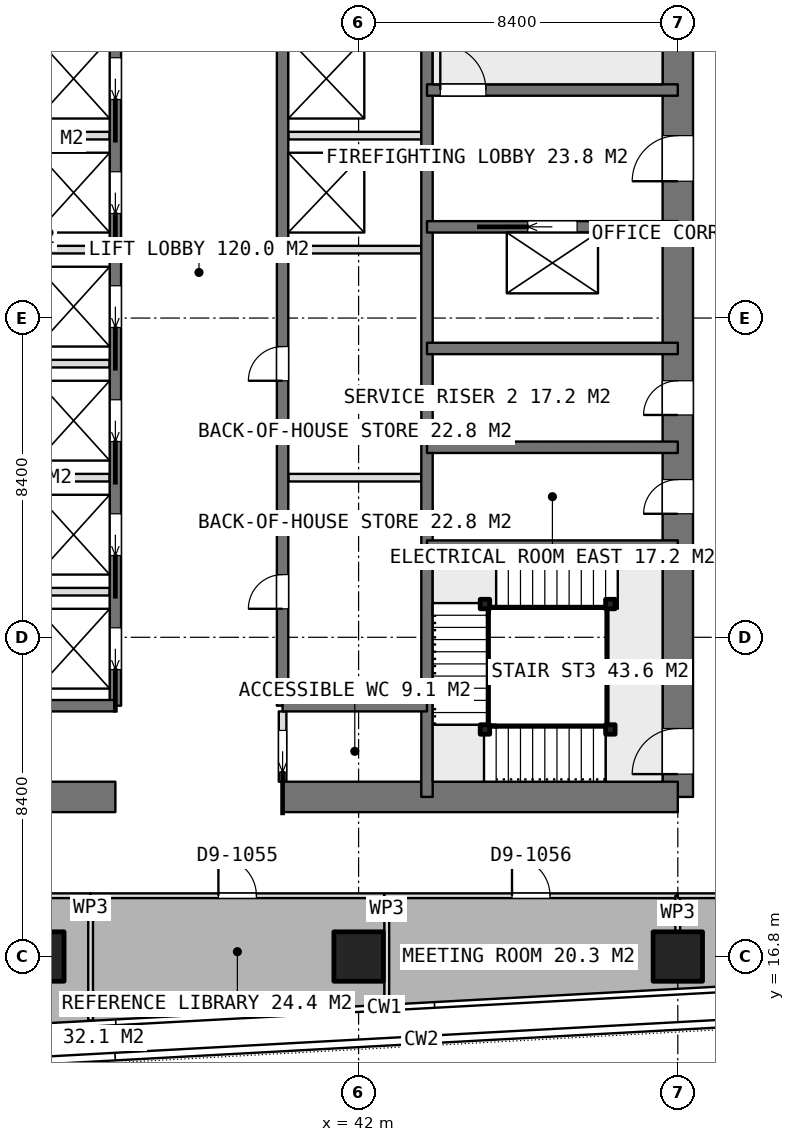
"""IFC4 building model, lengths in metres.
Left out: names, types, materials, properties, quantities, classifications, styles, units other than length and angle.
Written with IfcOpenShell. Run it as: python <this file> out.ifc"""

import sys

from ifc_helpers import new_model, si_unit, direction, frame, frame_2d, origin, origin_2d, place, context, subcontext, project, spatial, rectangle, extrude, element, fill, save


model = new_model("IFC4")
c1 = context("Model", 3, precision=1e-05, world=origin(), true_north=direction((0.0, 1.0)))
c2 = subcontext(c1, "Body", "Model", "MODEL_VIEW")
j1 = project(units=[si_unit("LENGTHUNIT", "METRE"), si_unit("PLANEANGLEUNIT", "RADIAN")], contexts=[c1])
p1 = place(None, origin())
s1 = spatial("IfcSite", under=j1, at=p1, CompositionType="ELEMENT")
p2 = place(p1, origin())
s2 = spatial("IfcBuilding", under=s1, at=p2, CompositionType="ELEMENT")
p3 = place(p2, frame((0.0, 0.0, 287.6)))
s3 = spatial("IfcBuildingStorey", under=s2, at=p3, CompositionType="ELEMENT", Elevation=287.6)
p4 = place(p3, frame((25.2, 21.0, 0.0), z_axis=(0.0, 0.0, 1.0), x_axis=(1.0, 0.0, 0.0)))
e1 = element("IfcWall", 1, at=p4, inside=s3, PredefinedType="SHEAR", context=c2, shape_type="SweptSolid", body=[
    extrude(rectangle(XDim=10.4, YDim=0.8, at=frame_2d((5.2, 0.0))), origin(), (0.0, 0.0, 1.0), 3.75),
])
p5 = place(p3, frame((40.0, 21.0, 0.0), z_axis=(0.0, 0.0, 1.0), x_axis=(1.0, 0.0, 0.0)))
e2 = element("IfcWall", 2, at=p5, inside=s3, PredefinedType="SHEAR", context=c2, shape_type="SweptSolid", body=[
    extrude(rectangle(XDim=10.4, YDim=0.8, at=frame_2d((5.2, 0.0))), origin(), (0.0, 0.0, 1.0), 3.75),
])
p6 = place(p3, frame((50.4, 21.0, 0.0), z_axis=(0.0, 0.0, 1.0), x_axis=(0.0, 1.0, 0.0)))
e3 = element("IfcWall", 3, at=p6, inside=s3, PredefinedType="SHEAR", context=c2, shape_type="SweptSolid", body=[
    extrude(rectangle(XDim=25.2, YDim=0.8, at=frame_2d((12.6, 0.0))), origin(), (0.0, 0.0, 1.0), 3.75),
])
p7 = place(p6, frame((16.2, 0.0, 0.0)))
e4 = element("IfcOpeningElement", 4, at=p7, cuts=e3, PredefinedType="OPENING", context=c2, shape_type="SweptSolid", body=[
    extrude(rectangle(XDim=1.2, YDim=2.1, at=frame_2d((0.6, 1.05))), frame((0.0, 0.41, 0.0), z_axis=(0.0, -1.0, 0.0), x_axis=(1.0, 0.0, 0.0)), (0.0, 0.0, 1.0), 0.82),
])
p8 = place(p6, frame((10.05, 0.0, 0.0)))
e5 = element("IfcOpeningElement", 5, at=p8, cuts=e3, PredefinedType="OPENING", context=c2, shape_type="SweptSolid", body=[
    extrude(rectangle(XDim=0.9, YDim=2.1, at=frame_2d((0.45, 1.05))), frame((0.0, 0.41, 0.0), z_axis=(0.0, -1.0, 0.0), x_axis=(1.0, 0.0, 0.0)), (0.0, 0.0, 1.0), 0.82),
])
p9 = place(p6, frame((7.45, 0.0, 0.0)))
e6 = element("IfcOpeningElement", 6, at=p9, cuts=e3, PredefinedType="OPENING", context=c2, shape_type="SweptSolid", body=[
    extrude(rectangle(XDim=0.9, YDim=2.1, at=frame_2d((0.45, 1.05))), frame((0.0, 0.41, 0.0), z_axis=(0.0, -1.0, 0.0), x_axis=(1.0, 0.0, 0.0)), (0.0, 0.0, 1.0), 0.82),
])
p10 = place(p6, frame((0.6, 0.0, 0.0)))
e7 = element("IfcOpeningElement", 7, at=p10, cuts=e3, PredefinedType="OPENING", context=c2, shape_type="SweptSolid", body=[
    extrude(rectangle(XDim=1.2, YDim=2.1, at=frame_2d((0.6, 1.05))), frame((0.0, 0.41, 0.0), z_axis=(0.0, -1.0, 0.0), x_axis=(1.0, 0.0, 0.0)), (0.0, 0.0, 1.0), 0.82),
])
p11 = place(p3, frame((43.8, 21.0, 0.0), z_axis=(0.0, 0.0, 1.0), x_axis=(0.0, 1.0, 0.0)))
e8 = element("IfcWall", 8, at=p11, inside=s3, PredefinedType="SHEAR", context=c2, shape_type="SweptSolid", body=[
    extrude(rectangle(XDim=25.2, YDim=0.3, at=frame_2d((12.6, 0.0))), origin(), (0.0, 0.0, 1.0), 3.75),
])
p12 = place(p3, frame((35.6, 23.4, 0.0), z_axis=(0.0, 0.0, 1.0), x_axis=(0.0, 1.0, 0.0)))
e9 = element("IfcWall", 9, at=p12, inside=s3, PredefinedType="SHEAR", context=c2, shape_type="SweptSolid", body=[
    extrude(rectangle(XDim=18.0, YDim=0.3, at=frame_2d((9.0, 0.0))), origin(), (0.0, 0.0, 1.0), 3.75),
])
p13 = place(p12, frame((0.95, 0.0, 0.0)))
e10 = element("IfcOpeningElement", 10, at=p13, cuts=e9, PredefinedType="OPENING", context=c2, shape_type="SweptSolid", body=[
    extrude(rectangle(XDim=1.1, YDim=2.1, at=frame_2d((0.55, 1.05))), frame((0.0, 0.16, 0.0), z_axis=(0.0, -1.0, 0.0), x_axis=(1.0, 0.0, 0.0)), (0.0, 0.0, 1.0), 0.32),
])
p14 = place(p12, frame((3.95, 0.0, 0.0)))
e11 = element("IfcOpeningElement", 11, at=p14, cuts=e9, PredefinedType="OPENING", context=c2, shape_type="SweptSolid", body=[
    extrude(rectangle(XDim=1.1, YDim=2.1, at=frame_2d((0.55, 1.05))), frame((0.0, 0.16, 0.0), z_axis=(0.0, -1.0, 0.0), x_axis=(1.0, 0.0, 0.0)), (0.0, 0.0, 1.0), 0.32),
])
p15 = place(p12, frame((6.95, 0.0, 0.0)))
e12 = element("IfcOpeningElement", 12, at=p15, cuts=e9, PredefinedType="OPENING", context=c2, shape_type="SweptSolid", body=[
    extrude(rectangle(XDim=1.1, YDim=2.1, at=frame_2d((0.55, 1.05))), frame((0.0, 0.16, 0.0), z_axis=(0.0, -1.0, 0.0), x_axis=(1.0, 0.0, 0.0)), (0.0, 0.0, 1.0), 0.32),
])
p16 = place(p12, frame((9.95, 0.0, 0.0)))
e13 = element("IfcOpeningElement", 13, at=p16, cuts=e9, PredefinedType="OPENING", context=c2, shape_type="SweptSolid", body=[
    extrude(rectangle(XDim=1.1, YDim=2.1, at=frame_2d((0.55, 1.05))), frame((0.0, 0.16, 0.0), z_axis=(0.0, -1.0, 0.0), x_axis=(1.0, 0.0, 0.0)), (0.0, 0.0, 1.0), 0.32),
])
p17 = place(p12, frame((12.95, 0.0, 0.0)))
e14 = element("IfcOpeningElement", 14, at=p17, cuts=e9, PredefinedType="OPENING", context=c2, shape_type="SweptSolid", body=[
    extrude(rectangle(XDim=1.1, YDim=2.1, at=frame_2d((0.55, 1.05))), frame((0.0, 0.16, 0.0), z_axis=(0.0, -1.0, 0.0), x_axis=(1.0, 0.0, 0.0)), (0.0, 0.0, 1.0), 0.32),
])
p18 = place(p12, frame((15.95, 0.0, 0.0)))
e15 = element("IfcOpeningElement", 15, at=p18, cuts=e9, PredefinedType="OPENING", context=c2, shape_type="SweptSolid", body=[
    extrude(rectangle(XDim=1.1, YDim=2.1, at=frame_2d((0.55, 1.05))), frame((0.0, 0.16, 0.0), z_axis=(0.0, -1.0, 0.0), x_axis=(1.0, 0.0, 0.0)), (0.0, 0.0, 1.0), 0.32),
])
p19 = place(p3, frame((40.0, 23.4, 0.0), z_axis=(0.0, 0.0, 1.0), x_axis=(0.0, 1.0, 0.0)))
e16 = element("IfcWall", 16, at=p19, inside=s3, PredefinedType="SHEAR", context=c2, shape_type="SweptSolid", body=[
    extrude(rectangle(XDim=18.0, YDim=0.3, at=frame_2d((9.0, 0.0))), origin(), (0.0, 0.0, 1.0), 3.75),
])
p20 = place(p19, frame((2.55, 0.0, 0.0)))
e17 = element("IfcOpeningElement", 17, at=p20, cuts=e16, PredefinedType="OPENING", context=c2, shape_type="SweptSolid", body=[
    extrude(rectangle(XDim=0.9, YDim=2.1, at=frame_2d((0.45, 1.05))), frame((0.0, 0.16, 0.0), z_axis=(0.0, -1.0, 0.0), x_axis=(1.0, 0.0, 0.0)), (0.0, 0.0, 1.0), 0.32),
])
p21 = place(p19, frame((8.55, 0.0, 0.0)))
e18 = element("IfcOpeningElement", 18, at=p21, cuts=e16, PredefinedType="OPENING", context=c2, shape_type="SweptSolid", body=[
    extrude(rectangle(XDim=0.9, YDim=2.1, at=frame_2d((0.45, 1.05))), frame((0.0, 0.16, 0.0), z_axis=(0.0, -1.0, 0.0), x_axis=(1.0, 0.0, 0.0)), (0.0, 0.0, 1.0), 0.32),
])
for number, where, z_axis, x_axis in (
    (19, (31.8, 23.4, 0.0), (0.0, 0.0, 1.0), (1.0, 0.0, 0.0)),
    (20, (40.0, 23.4, 0.0), (0.0, 0.0, 1.0), (1.0, 0.0, 0.0)),
):
    element("IfcWall", number, at=place(p3, frame(where, z_axis=z_axis, x_axis=x_axis)), inside=s3, PredefinedType="SHEAR", context=c2, shape_type="SweptSolid", body=[
        extrude(rectangle(XDim=3.8, YDim=0.3, at=frame_2d((1.9, 0.0))), origin(), (0.0, 0.0, 1.0), 3.75),
    ])
for number, where, z_axis, x_axis in (
    (21, (43.8, 27.6, 0.0), (0.0, 0.0, 1.0), (1.0, 0.0, 0.0)),
    (22, (43.8, 30.2, 0.0), (0.0, 0.0, 1.0), (1.0, 0.0, 0.0)),
    (23, (43.8, 32.8, 0.0), (0.0, 0.0, 1.0), (1.0, 0.0, 0.0)),
):
    element("IfcWall", number, at=place(p3, frame(where, z_axis=z_axis, x_axis=x_axis)), inside=s3, PredefinedType="SHEAR", context=c2, shape_type="SweptSolid", body=[
        extrude(rectangle(XDim=6.6, YDim=0.3, at=frame_2d((3.3, 0.0))), origin(), (0.0, 0.0, 1.0), 3.75),
    ])
p22 = place(p3, frame((43.8, 36.0, 0.0), z_axis=(0.0, 0.0, 1.0), x_axis=(1.0, 0.0, 0.0)))
e24 = element("IfcWall", 24, at=p22, inside=s3, PredefinedType="SHEAR", context=c2, shape_type="SweptSolid", body=[
    extrude(rectangle(XDim=6.6, YDim=0.3, at=frame_2d((3.3, 0.0))), origin(), (0.0, 0.0, 1.0), 3.75),
])
p23 = place(p22, frame((2.65, 0.0, 0.0)))
e25 = element("IfcOpeningElement", 25, at=p23, cuts=e24, PredefinedType="OPENING", context=c2, shape_type="SweptSolid", body=[
    extrude(rectangle(XDim=1.3, YDim=2.1, at=frame_2d((0.65, 1.05))), frame((0.0, 0.16, 0.0), z_axis=(0.0, -1.0, 0.0), x_axis=(1.0, 0.0, 0.0)), (0.0, 0.0, 1.0), 0.32),
])
p24 = place(p3, frame((43.8, 39.6, 0.0), z_axis=(0.0, 0.0, 1.0), x_axis=(1.0, 0.0, 0.0)))
e26 = element("IfcWall", 26, at=p24, inside=s3, PredefinedType="SHEAR", context=c2, shape_type="SweptSolid", body=[
    extrude(rectangle(XDim=6.6, YDim=0.3, at=frame_2d((3.3, 0.0))), origin(), (0.0, 0.0, 1.0), 3.75),
])
p25 = place(p24, frame((0.35, 0.0, 0.0)))
e27 = element("IfcOpeningElement", 27, at=p25, cuts=e26, PredefinedType="OPENING", context=c2, shape_type="SweptSolid", body=[
    extrude(rectangle(XDim=1.2, YDim=2.1, at=frame_2d((0.6, 1.05))), frame((0.0, 0.16, 0.0), z_axis=(0.0, -1.0, 0.0), x_axis=(1.0, 0.0, 0.0)), (0.0, 0.0, 1.0), 0.32),
])
for number, where, z_axis, x_axis in (
    (28, (33.6, 16.8, 0.0), (0.0, 0.0, 1.0), (1.0, 0.0, 0.0)),
    (29, (42.0, 16.8, 0.0), (0.0, 0.0, 1.0), (1.0, 0.0, 0.0)),
    (30, (50.4, 16.8, 0.0), (0.0, 0.0, 1.0), (1.0, 0.0, 0.0)),
):
    element("IfcColumn", number, at=place(p3, frame(where, z_axis=z_axis, x_axis=x_axis)), inside=s3, PredefinedType="COLUMN", context=c2, shape_type="SweptSolid", body=[
        extrude(rectangle(XDim=1.3, YDim=1.3, at=origin_2d()), origin(), (0.0, 0.0, 1.0), 3.75),
    ])
for number, where, z_axis, x_axis in (
    (31, (31.95, 26.4, 0.0), (0.0, 0.0, 1.0), (1.0, 0.0, 0.0)),
    (32, (31.95, 29.4, 0.0), (0.0, 0.0, 1.0), (1.0, 0.0, 0.0)),
    (33, (31.95, 32.4, 0.0), (0.0, 0.0, 1.0), (1.0, 0.0, 0.0)),
    (34, (31.95, 35.4, 0.0), (0.0, 0.0, 1.0), (1.0, 0.0, 0.0)),
    (35, (31.95, 38.4, 0.0), (0.0, 0.0, 1.0), (1.0, 0.0, 0.0)),
    (36, (40.15, 29.4, 0.0), (0.0, 0.0, 1.0), (1.0, 0.0, 0.0)),
    (37, (40.15, 35.4, 0.0), (0.0, 0.0, 1.0), (1.0, 0.0, 0.0)),
    (38, (40.15, 38.4, 0.0), (0.0, 0.0, 1.0), (1.0, 0.0, 0.0)),
):
    element("IfcWall", number, at=place(p3, frame(where, z_axis=z_axis, x_axis=x_axis)), inside=s3, PredefinedType="PARTITIONING", context=c2, shape_type="SweptSolid", body=[
        extrude(rectangle(XDim=3.5, YDim=0.2, at=frame_2d((1.75, 0.0))), origin(), (0.0, 0.0, 1.0), 3.45),
    ])
p26 = place(p3, frame((40.0, 21.4, 0.0), z_axis=(0.0, 0.0, 1.0), x_axis=(0.0, 1.0, 0.0)))
e39 = element("IfcWall", 39, at=p26, inside=s3, PredefinedType="PARTITIONING", context=c2, shape_type="SweptSolid", body=[
    extrude(rectangle(XDim=1.85, YDim=0.2, at=frame_2d((0.925, 0.0))), origin(), (0.0, 0.0, 1.0), 3.45),
])
p27 = place(p26, frame((0.25, 0.0, 0.0)))
e40 = element("IfcOpeningElement", 40, at=p27, cuts=e39, PredefinedType="OPENING", context=c2, shape_type="SweptSolid", body=[
    extrude(rectangle(XDim=1.1, YDim=2.1, at=frame_2d((0.55, 1.05))), frame((0.0, 0.11, 0.0), z_axis=(0.0, -1.0, 0.0), x_axis=(1.0, 0.0, 0.0)), (0.0, 0.0, 1.0), 0.22),
])
p28 = place(p3, frame((42.674, 18.4, 0.0), z_axis=(0.0, 0.0, 1.0), x_axis=(1.0, 0.0, 0.0)))
e41 = element("IfcWall", 41, at=p28, inside=s3, PredefinedType="PARTITIONING", context=c2, shape_type="SweptSolid", body=[
    extrude(rectangle(XDim=7.725, YDim=0.125, at=frame_2d((3.862, 0.0))), origin(), (0.0, 0.0, 1.0), 3.45),
])
p29 = place(p28, frame((3.363, 0.0, 0.0)))
e42 = element("IfcOpeningElement", 42, at=p29, cuts=e41, PredefinedType="OPENING", context=c2, shape_type="SweptSolid", body=[
    extrude(rectangle(XDim=1.0, YDim=2.1, at=frame_2d((0.5, 1.05))), frame((0.0, 0.073, 0.0), z_axis=(0.0, -1.0, 0.0), x_axis=(1.0, 0.0, 0.0)), (0.0, 0.0, 1.0), 0.145),
])
p30 = place(p3, frame((50.399, 18.4, 0.0), z_axis=(0.0, 0.0, 1.0), x_axis=(0.0, -1.0, 0.0)))
e43 = element("IfcWall", 43, at=p30, inside=s3, PredefinedType="PARTITIONING", context=c2, shape_type="SweptSolid", body=[
    extrude(rectangle(XDim=0.93, YDim=0.125, at=frame_2d((0.465, 0.0))), origin(), (0.0, 0.0, 1.0), 3.45),
])
p31 = place(p3, frame((42.742, 15.538, 0.0), z_axis=(0.0, 0.0, 1.0), x_axis=(0.0, 1.0, 0.0)))
e44 = element("IfcWall", 44, at=p31, inside=s3, PredefinedType="PARTITIONING", context=c2, shape_type="SweptSolid", body=[
    extrude(rectangle(XDim=2.799, YDim=0.125, at=frame_2d((1.399, 0.0))), origin(), (0.0, 0.0, 1.0), 3.45),
])
p32 = place(p3, frame((50.4, 18.4, 0.0), z_axis=(0.0, 0.0, 1.0), x_axis=(1.0, 0.0, 0.0)))
e45 = element("IfcWall", 45, at=p32, inside=s3, PredefinedType="PARTITIONING", context=c2, shape_type="SweptSolid", body=[
    extrude(rectangle(XDim=6.0, YDim=0.125, at=frame_2d((3.0, 0.0))), origin(), (0.0, 0.0, 1.0), 3.45),
])
p33 = place(p32, frame((2.5, 0.0, 0.0)))
e46 = element("IfcOpeningElement", 46, at=p33, cuts=e45, PredefinedType="OPENING", context=c2, shape_type="SweptSolid", body=[
    extrude(rectangle(XDim=1.0, YDim=2.1, at=frame_2d((0.5, 1.05))), frame((0.0, 0.073, 0.0), z_axis=(0.0, -1.0, 0.0), x_axis=(1.0, 0.0, 0.0)), (0.0, 0.0, 1.0), 0.145),
])
p34 = place(p3, frame((34.948, 15.114, 0.0), z_axis=(0.0, 0.0, 1.0), x_axis=(0.0, 1.0, 0.0)))
e47 = element("IfcWall", 47, at=p34, inside=s3, PredefinedType="PARTITIONING", context=c2, shape_type="SweptSolid", body=[
    extrude(rectangle(XDim=3.286, YDim=0.125, at=frame_2d((1.643, 0.0))), origin(), (0.0, 0.0, 1.0), 3.45),
])
p35 = place(p3, frame((34.948, 18.4, 0.0), z_axis=(0.0, 0.0, 1.0), x_axis=(1.0, 0.0, 0.0)))
e48 = element("IfcWall", 48, at=p35, inside=s3, PredefinedType="PARTITIONING", context=c2, shape_type="SweptSolid", body=[
    extrude(rectangle(XDim=7.725, YDim=0.125, at=frame_2d((3.863, 0.0))), origin(), (0.0, 0.0, 1.0), 3.45),
])
p36 = place(p35, frame((3.363, 0.0, 0.0)))
e49 = element("IfcOpeningElement", 49, at=p36, cuts=e48, PredefinedType="OPENING", context=c2, shape_type="SweptSolid", body=[
    extrude(rectangle(XDim=1.0, YDim=2.1, at=frame_2d((0.5, 1.05))), frame((0.0, 0.073, 0.0), z_axis=(0.0, -1.0, 0.0), x_axis=(1.0, 0.0, 0.0)), (0.0, 0.0, 1.0), 0.145),
])
p37 = place(p3, frame((26.027, 18.4, 0.0), z_axis=(0.0, 0.0, 1.0), x_axis=(1.0, 0.0, 0.0)))
e50 = element("IfcWall", 50, at=p37, inside=s3, PredefinedType="PARTITIONING", context=c2, shape_type="SweptSolid", body=[
    extrude(rectangle(XDim=8.92, YDim=0.125, at=frame_2d((4.46, 0.0))), origin(), (0.0, 0.0, 1.0), 3.45),
])
p38 = place(p37, frame((3.96, 0.0, 0.0)))
e51 = element("IfcOpeningElement", 51, at=p38, cuts=e50, PredefinedType="OPENING", context=c2, shape_type="SweptSolid", body=[
    extrude(rectangle(XDim=1.0, YDim=2.1, at=frame_2d((0.5, 1.05))), frame((0.0, 0.073, 0.0), z_axis=(0.0, -1.0, 0.0), x_axis=(1.0, 0.0, 0.0)), (0.0, 0.0, 1.0), 0.145),
])
for number, where, z_axis, x_axis in (
    (52, (48.625, 22.775, 0.0), (0.0, 0.0, 1.0), (1.0, 0.0, 0.0)),
    (53, (45.325, 22.775, 0.0), (0.0, 0.0, 1.0), (1.0, 0.0, 0.0)),
    (54, (45.325, 26.075, 0.0), (0.0, 0.0, 1.0), (1.0, 0.0, 0.0)),
    (55, (48.625, 26.075, 0.0), (0.0, 0.0, 1.0), (1.0, 0.0, 0.0)),
):
    element("IfcColumn", number, at=place(p3, frame(where, z_axis=z_axis, x_axis=x_axis)), inside=s3, PredefinedType="COLUMN", context=c2, shape_type="SweptSolid", body=[
        extrude(rectangle(XDim=0.25, YDim=0.25, at=origin_2d()), origin(), (0.0, 0.0, 1.0), 3.75),
    ])
p39 = place(p7, origin())
e56 = element("IfcDoor", 56, at=p39, inside=s3, OperationType="SINGLE_SWING_LEFT", PredefinedType="DOOR", context=c2, shape_type="SweptSolid", body=[
    extrude(rectangle(XDim=1.2, YDim=2.1, at=frame_2d((0.6, 1.05))), frame((0.0, 0.025, 0.0), z_axis=(0.0, -1.0, 0.0), x_axis=(1.0, 0.0, 0.0)), (0.0, 0.0, 1.0), 0.05),
])
fill(e4, e56)
p40 = place(p8, origin())
e57 = element("IfcDoor", 57, at=p40, inside=s3, OperationType="SINGLE_SWING_LEFT", PredefinedType="DOOR", context=c2, shape_type="SweptSolid", body=[
    extrude(rectangle(XDim=0.9, YDim=2.1, at=frame_2d((0.45, 1.05))), frame((0.0, 0.025, 0.0), z_axis=(0.0, -1.0, 0.0), x_axis=(1.0, 0.0, 0.0)), (0.0, 0.0, 1.0), 0.05),
])
fill(e5, e57)
p41 = place(p9, origin())
e58 = element("IfcDoor", 58, at=p41, inside=s3, OperationType="SINGLE_SWING_LEFT", PredefinedType="DOOR", context=c2, shape_type="SweptSolid", body=[
    extrude(rectangle(XDim=0.9, YDim=2.1, at=frame_2d((0.45, 1.05))), frame((0.0, 0.025, 0.0), z_axis=(0.0, -1.0, 0.0), x_axis=(1.0, 0.0, 0.0)), (0.0, 0.0, 1.0), 0.05),
])
fill(e6, e58)
p42 = place(p27, origin())
e59 = element("IfcDoor", 59, at=p42, inside=s3, OperationType="SLIDING_TO_LEFT", PredefinedType="DOOR", context=c2, shape_type="SweptSolid", body=[
    extrude(rectangle(XDim=1.1, YDim=2.1, at=frame_2d((0.55, 1.05))), frame((0.0, 0.025, 0.0), z_axis=(0.0, -1.0, 0.0), x_axis=(1.0, 0.0, 0.0)), (0.0, 0.0, 1.0), 0.05),
])
fill(e40, e59)
p43 = place(p20, origin())
e60 = element("IfcDoor", 60, at=p43, inside=s3, OperationType="SINGLE_SWING_LEFT", PredefinedType="DOOR", context=c2, shape_type="SweptSolid", body=[
    extrude(rectangle(XDim=0.9, YDim=2.1, at=frame_2d((0.45, 1.05))), frame((0.0, 0.025, 0.0), z_axis=(0.0, -1.0, 0.0), x_axis=(1.0, 0.0, 0.0)), (0.0, 0.0, 1.0), 0.05),
])
fill(e17, e60)
p44 = place(p21, origin())
e61 = element("IfcDoor", 61, at=p44, inside=s3, OperationType="SINGLE_SWING_LEFT", PredefinedType="DOOR", context=c2, shape_type="SweptSolid", body=[
    extrude(rectangle(XDim=0.9, YDim=2.1, at=frame_2d((0.45, 1.05))), frame((0.0, 0.025, 0.0), z_axis=(0.0, -1.0, 0.0), x_axis=(1.0, 0.0, 0.0)), (0.0, 0.0, 1.0), 0.05),
])
fill(e18, e61)
p45 = place(p13, origin())
e62 = element("IfcDoor", 62, at=p45, inside=s3, OperationType="SLIDING_TO_LEFT", PredefinedType="USERDEFINED", context=c2, shape_type="SweptSolid", body=[
    extrude(rectangle(XDim=1.1, YDim=2.1, at=frame_2d((0.55, 1.05))), frame((0.0, 0.025, 0.0), z_axis=(0.0, -1.0, 0.0), x_axis=(1.0, 0.0, 0.0)), (0.0, 0.0, 1.0), 0.05),
])
fill(e10, e62)
p46 = place(p14, origin())
e63 = element("IfcDoor", 63, at=p46, inside=s3, OperationType="SLIDING_TO_LEFT", PredefinedType="USERDEFINED", context=c2, shape_type="SweptSolid", body=[
    extrude(rectangle(XDim=1.1, YDim=2.1, at=frame_2d((0.55, 1.05))), frame((0.0, 0.025, 0.0), z_axis=(0.0, -1.0, 0.0), x_axis=(1.0, 0.0, 0.0)), (0.0, 0.0, 1.0), 0.05),
])
fill(e11, e63)
p47 = place(p15, origin())
e64 = element("IfcDoor", 64, at=p47, inside=s3, OperationType="SLIDING_TO_LEFT", PredefinedType="USERDEFINED", context=c2, shape_type="SweptSolid", body=[
    extrude(rectangle(XDim=1.1, YDim=2.1, at=frame_2d((0.55, 1.05))), frame((0.0, 0.025, 0.0), z_axis=(0.0, -1.0, 0.0), x_axis=(1.0, 0.0, 0.0)), (0.0, 0.0, 1.0), 0.05),
])
fill(e12, e64)
p48 = place(p16, origin())
e65 = element("IfcDoor", 65, at=p48, inside=s3, OperationType="SLIDING_TO_LEFT", PredefinedType="USERDEFINED", context=c2, shape_type="SweptSolid", body=[
    extrude(rectangle(XDim=1.1, YDim=2.1, at=frame_2d((0.55, 1.05))), frame((0.0, 0.025, 0.0), z_axis=(0.0, -1.0, 0.0), x_axis=(1.0, 0.0, 0.0)), (0.0, 0.0, 1.0), 0.05),
])
fill(e13, e65)
p49 = place(p17, origin())
e66 = element("IfcDoor", 66, at=p49, inside=s3, OperationType="SLIDING_TO_LEFT", PredefinedType="USERDEFINED", context=c2, shape_type="SweptSolid", body=[
    extrude(rectangle(XDim=1.1, YDim=2.1, at=frame_2d((0.55, 1.05))), frame((0.0, 0.025, 0.0), z_axis=(0.0, -1.0, 0.0), x_axis=(1.0, 0.0, 0.0)), (0.0, 0.0, 1.0), 0.05),
])
fill(e14, e66)
p50 = place(p18, origin())
e67 = element("IfcDoor", 67, at=p50, inside=s3, OperationType="SLIDING_TO_LEFT", PredefinedType="USERDEFINED", context=c2, shape_type="SweptSolid", body=[
    extrude(rectangle(XDim=1.1, YDim=2.1, at=frame_2d((0.55, 1.05))), frame((0.0, 0.025, 0.0), z_axis=(0.0, -1.0, 0.0), x_axis=(1.0, 0.0, 0.0)), (0.0, 0.0, 1.0), 0.05),
])
fill(e15, e67)
p51 = place(p23, origin())
e68 = element("IfcDoor", 68, at=p51, inside=s3, OperationType="SLIDING_TO_LEFT", PredefinedType="USERDEFINED", context=c2, shape_type="SweptSolid", body=[
    extrude(rectangle(XDim=1.3, YDim=2.1, at=frame_2d((0.65, 1.05))), frame((0.0, 0.025, 0.0), z_axis=(0.0, -1.0, 0.0), x_axis=(1.0, 0.0, 0.0)), (0.0, 0.0, 1.0), 0.05),
])
fill(e25, e68)
p52 = place(p29, origin())
e69 = element("IfcDoor", 69, at=p52, inside=s3, OperationType="SINGLE_SWING_LEFT", PredefinedType="DOOR", context=c2, shape_type="SweptSolid", body=[
    extrude(rectangle(XDim=1.0, YDim=2.1, at=frame_2d((0.5, 1.05))), frame((0.0, 0.025, 0.0), z_axis=(0.0, -1.0, 0.0), x_axis=(1.0, 0.0, 0.0)), (0.0, 0.0, 1.0), 0.05),
])
fill(e42, e69)
p53 = place(p36, origin())
e70 = element("IfcDoor", 70, at=p53, inside=s3, OperationType="SINGLE_SWING_LEFT", PredefinedType="DOOR", context=c2, shape_type="SweptSolid", body=[
    extrude(rectangle(XDim=1.0, YDim=2.1, at=frame_2d((0.5, 1.05))), frame((0.0, 0.025, 0.0), z_axis=(0.0, -1.0, 0.0), x_axis=(1.0, 0.0, 0.0)), (0.0, 0.0, 1.0), 0.05),
])
fill(e49, e70)
p54 = place(p25, origin())
e71 = element("IfcDoor", 71, at=p54, inside=s3, OperationType="SINGLE_SWING_RIGHT", PredefinedType="DOOR", context=c2, shape_type="SweptSolid", body=[
    extrude(rectangle(XDim=1.2, YDim=2.1, at=frame_2d((0.6, 1.05))), frame((0.0, 0.025, 0.0), z_axis=(0.0, -1.0, 0.0), x_axis=(1.0, 0.0, 0.0)), (0.0, 0.0, 1.0), 0.05),
])
fill(e27, e71)
p55 = place(p10, origin())
e72 = element("IfcDoor", 72, at=p55, inside=s3, OperationType="SINGLE_SWING_RIGHT", PredefinedType="DOOR", context=c2, shape_type="SweptSolid", body=[
    extrude(rectangle(XDim=1.2, YDim=2.1, at=frame_2d((0.6, 1.05))), frame((0.0, 0.025, 0.0), z_axis=(0.0, -1.0, 0.0), x_axis=(1.0, 0.0, 0.0)), (0.0, 0.0, 1.0), 0.05),
])
fill(e7, e72)
save(model, sys.argv[1])
